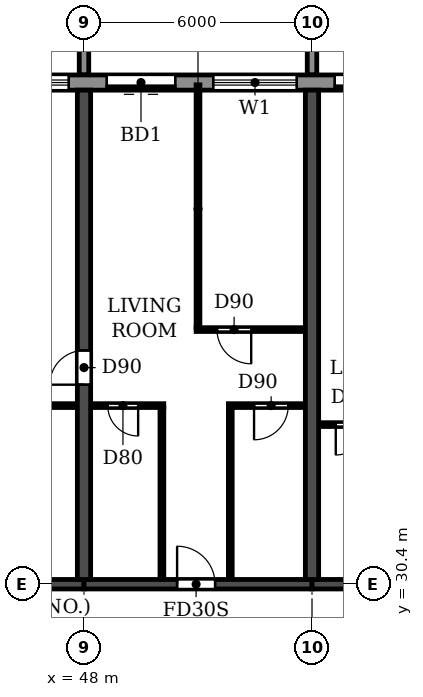
"""IFC4 building model, lengths in metres.
Left out: names, types, materials, properties, quantities, classifications, styles, units other than length and angle.
Written with IfcOpenShell. Run it as: python <this file> out.ifc"""

import sys

from ifc_helpers import new_model, si_unit, direction, frame, frame_2d, origin, place, context, subcontext, project, spatial, polyline, rectangle, outline, extrude, source, transform, mapped, element, fill, save


model = new_model("IFC4")
c1 = context("Model", 3, precision=1e-05, world=origin(), true_north=direction((0.0, 1.0)))
c2 = subcontext(c1, "Body", "Model", "MODEL_VIEW")
j1 = project(units=[si_unit("LENGTHUNIT", "METRE"), si_unit("PLANEANGLEUNIT", "RADIAN")], contexts=[c1])
p1 = place(None, origin())
s1 = spatial("IfcSite", under=j1, at=p1, CompositionType="ELEMENT")
p2 = place(p1, origin())
s2 = spatial("IfcBuilding", under=s1, at=p2, CompositionType="ELEMENT")
p3 = place(p2, frame((0.0, 0.0, 112.5)))
s3 = spatial("IfcBuildingStorey", under=s2, at=p3, CompositionType="ELEMENT", Elevation=112.5)
p4 = place(p3, frame((48.0, 30.525, 0.0), z_axis=(0.0, 0.0, 1.0), x_axis=(0.0, 1.0, 0.0)))
e1 = element("IfcWall", 1, at=p4, inside=s3, PredefinedType="SHEAR", context=c2, shape_type="SweptSolid", body=[
    extrude(rectangle(XDim=12.875, YDim=0.35, at=frame_2d((6.438, 0.0))), origin(), (0.0, 0.0, 1.0), 2.95),
])
p5 = place(p4, frame((5.125, 0.0, 0.0)))
e2 = element("IfcOpeningElement", 2, at=p5, cuts=e1, PredefinedType="OPENING", context=c2, shape_type="SweptSolid", body=[
    extrude(rectangle(XDim=0.9, YDim=2.1, at=frame_2d((0.45, 1.05))), frame((0.0, 0.185, 0.0), z_axis=(0.0, -1.0, 0.0), x_axis=(1.0, 0.0, 0.0)), (0.0, 0.0, 1.0), 0.37),
])
p6 = place(p3, frame((54.0, 30.525, 0.0), z_axis=(0.0, 0.0, 1.0), x_axis=(0.0, 1.0, 0.0)))
e3 = element("IfcWall", 3, at=p6, inside=s3, PredefinedType="SHEAR", context=c2, shape_type="SweptSolid", body=[
    extrude(rectangle(XDim=12.875, YDim=0.35, at=frame_2d((6.438, 0.0))), origin(), (0.0, 0.0, 1.0), 2.95),
])
p7 = place(p3, frame((42.0, 30.4, 0.0), z_axis=(0.0, 0.0, 1.0), x_axis=(1.0, 0.0, 0.0)))
e4 = element("IfcWall", 4, at=p7, inside=s3, PredefinedType="SHEAR", context=c2, shape_type="SweptSolid", body=[
    extrude(rectangle(XDim=6.0, YDim=0.25, at=frame_2d((3.0, 0.0))), origin(), (0.0, 0.0, 1.0), 2.35),
])
p8 = place(p3, frame((48.0, 30.4, 0.0), z_axis=(0.0, 0.0, 1.0), x_axis=(1.0, 0.0, 0.0)))
e5 = element("IfcWall", 5, at=p8, inside=s3, PredefinedType="SHEAR", context=c2, shape_type="SweptSolid", body=[
    extrude(rectangle(XDim=6.0, YDim=0.25, at=frame_2d((3.0, 0.0))), origin(), (0.0, 0.0, 1.0), 2.35),
])
p9 = place(p8, frame((2.45, 0.0, 0.0)))
e6 = element("IfcOpeningElement", 6, at=p9, cuts=e5, PredefinedType="OPENING", context=c2, shape_type="SweptSolid", body=[
    extrude(rectangle(XDim=1.0, YDim=2.1, at=frame_2d((0.5, 1.05))), frame((0.0, 0.135, 0.0), z_axis=(0.0, -1.0, 0.0), x_axis=(1.0, 0.0, 0.0)), (0.0, 0.0, 1.0), 0.27),
])
p10 = place(p3, frame((54.0, 30.4, 0.0), z_axis=(0.0, 0.0, 1.0), x_axis=(1.0, 0.0, 0.0)))
e7 = element("IfcWall", 7, at=p10, inside=s3, PredefinedType="SHEAR", context=c2, shape_type="SweptSolid", body=[
    extrude(rectangle(XDim=6.0, YDim=0.25, at=frame_2d((3.0, 0.0))), origin(), (0.0, 0.0, 1.0), 2.35),
])
p11 = place(p10, frame((2.45, 0.0, 0.0)))
e8 = element("IfcOpeningElement", 8, at=p11, cuts=e7, PredefinedType="OPENING", context=c2, shape_type="SweptSolid", body=[
    extrude(rectangle(XDim=1.0, YDim=2.1, at=frame_2d((0.5, 1.05))), frame((0.0, 0.135, 0.0), z_axis=(0.0, -1.0, 0.0), x_axis=(1.0, 0.0, 0.0)), (0.0, 0.0, 1.0), 0.27),
])
p12 = place(p3, frame((85.317, 43.6, 0.0), z_axis=(0.0, 0.0, 1.0), x_axis=(-1.0, 0.0, 0.0)))
e9 = element("IfcWall", 9, at=p12, inside=s3, PredefinedType="STANDARD", context=c2, shape_type="SweptSolid", body=[
    extrude(rectangle(XDim=68.634, YDim=0.4, at=frame_2d((34.317, 0.0))), origin(), (0.0, 0.0, 1.0), 2.95),
])
p13 = place(p12, frame((64.917, 0.0, 0.0)))
e10 = element("IfcOpeningElement", 10, at=p13, cuts=e9, PredefinedType="OPENING", context=c2, shape_type="SweptSolid", body=[
    extrude(rectangle(XDim=1.8, YDim=2.4, at=frame_2d((0.9, 1.2))), frame((0.0, 0.21, 0.0), z_axis=(0.0, -1.0, 0.0), x_axis=(1.0, 0.0, 0.0)), (0.0, 0.0, 1.0), 0.42),
])
p14 = place(p12, frame((61.717, 0.0, 0.9)))
e11 = element("IfcOpeningElement", 11, at=p14, cuts=e9, PredefinedType="OPENING", context=c2, shape_type="SweptSolid", body=[
    extrude(rectangle(XDim=2.2, YDim=1.5, at=frame_2d((1.1, 0.75))), frame((0.0, 0.21, 0.0), z_axis=(0.0, -1.0, 0.0), x_axis=(1.0, 0.0, 0.0)), (0.0, 0.0, 1.0), 0.42),
])
p15 = place(p12, frame((58.717, 0.0, 0.9)))
e12 = element("IfcOpeningElement", 12, at=p15, cuts=e9, PredefinedType="OPENING", context=c2, shape_type="SweptSolid", body=[
    extrude(rectangle(XDim=2.2, YDim=1.5, at=frame_2d((1.1, 0.75))), frame((0.0, 0.21, 0.0), z_axis=(0.0, -1.0, 0.0), x_axis=(1.0, 0.0, 0.0)), (0.0, 0.0, 1.0), 0.42),
])
p16 = place(p12, frame((55.917, 0.0, 0.0)))
e13 = element("IfcOpeningElement", 13, at=p16, cuts=e9, PredefinedType="OPENING", context=c2, shape_type="SweptSolid", body=[
    extrude(rectangle(XDim=1.8, YDim=2.4, at=frame_2d((0.9, 1.2))), frame((0.0, 0.21, 0.0), z_axis=(0.0, -1.0, 0.0), x_axis=(1.0, 0.0, 0.0)), (0.0, 0.0, 1.0), 0.42),
])
p17 = place(p12, frame((52.917, 0.0, 0.0)))
e14 = element("IfcOpeningElement", 14, at=p17, cuts=e9, PredefinedType="OPENING", context=c2, shape_type="SweptSolid", body=[
    extrude(rectangle(XDim=1.8, YDim=2.4, at=frame_2d((0.9, 1.2))), frame((0.0, 0.21, 0.0), z_axis=(0.0, -1.0, 0.0), x_axis=(1.0, 0.0, 0.0)), (0.0, 0.0, 1.0), 0.42),
])
p18 = place(p12, frame((49.717, 0.0, 0.9)))
e15 = element("IfcOpeningElement", 15, at=p18, cuts=e9, PredefinedType="OPENING", context=c2, shape_type="SweptSolid", body=[
    extrude(rectangle(XDim=2.2, YDim=1.5, at=frame_2d((1.1, 0.75))), frame((0.0, 0.21, 0.0), z_axis=(0.0, -1.0, 0.0), x_axis=(1.0, 0.0, 0.0)), (0.0, 0.0, 1.0), 0.42),
])
p19 = place(p12, frame((46.717, 0.0, 0.9)))
e16 = element("IfcOpeningElement", 16, at=p19, cuts=e9, PredefinedType="OPENING", context=c2, shape_type="SweptSolid", body=[
    extrude(rectangle(XDim=2.2, YDim=1.5, at=frame_2d((1.1, 0.75))), frame((0.0, 0.21, 0.0), z_axis=(0.0, -1.0, 0.0), x_axis=(1.0, 0.0, 0.0)), (0.0, 0.0, 1.0), 0.42),
])
p20 = place(p12, frame((43.917, 0.0, 0.0)))
e17 = element("IfcOpeningElement", 17, at=p20, cuts=e9, PredefinedType="OPENING", context=c2, shape_type="SweptSolid", body=[
    extrude(rectangle(XDim=1.8, YDim=2.4, at=frame_2d((0.9, 1.2))), frame((0.0, 0.21, 0.0), z_axis=(0.0, -1.0, 0.0), x_axis=(1.0, 0.0, 0.0)), (0.0, 0.0, 1.0), 0.42),
])
p21 = place(p12, frame((40.717, 0.0, 0.9)))
e18 = element("IfcOpeningElement", 18, at=p21, cuts=e9, PredefinedType="OPENING", context=c2, shape_type="SweptSolid", body=[
    extrude(rectangle(XDim=2.2, YDim=1.5, at=frame_2d((1.1, 0.75))), frame((0.0, 0.21, 0.0), z_axis=(0.0, -1.0, 0.0), x_axis=(1.0, 0.0, 0.0)), (0.0, 0.0, 1.0), 0.42),
])
p22 = place(p12, frame((37.717, 0.0, 0.9)))
e19 = element("IfcOpeningElement", 19, at=p22, cuts=e9, PredefinedType="OPENING", context=c2, shape_type="SweptSolid", body=[
    extrude(rectangle(XDim=2.2, YDim=1.5, at=frame_2d((1.1, 0.75))), frame((0.0, 0.21, 0.0), z_axis=(0.0, -1.0, 0.0), x_axis=(1.0, 0.0, 0.0)), (0.0, 0.0, 1.0), 0.42),
])
p23 = place(p12, frame((34.917, 0.0, 0.0)))
e20 = element("IfcOpeningElement", 20, at=p23, cuts=e9, PredefinedType="OPENING", context=c2, shape_type="SweptSolid", body=[
    extrude(rectangle(XDim=1.8, YDim=2.4, at=frame_2d((0.9, 1.2))), frame((0.0, 0.21, 0.0), z_axis=(0.0, -1.0, 0.0), x_axis=(1.0, 0.0, 0.0)), (0.0, 0.0, 1.0), 0.42),
])
p24 = place(p12, frame((31.717, 0.0, 0.9)))
e21 = element("IfcOpeningElement", 21, at=p24, cuts=e9, PredefinedType="OPENING", context=c2, shape_type="SweptSolid", body=[
    extrude(rectangle(XDim=2.2, YDim=1.5, at=frame_2d((1.1, 0.75))), frame((0.0, 0.21, 0.0), z_axis=(0.0, -1.0, 0.0), x_axis=(1.0, 0.0, 0.0)), (0.0, 0.0, 1.0), 0.42),
])
p25 = place(p12, frame((28.917, 0.0, 0.0)))
e22 = element("IfcOpeningElement", 22, at=p25, cuts=e9, PredefinedType="OPENING", context=c2, shape_type="SweptSolid", body=[
    extrude(rectangle(XDim=1.8, YDim=2.4, at=frame_2d((0.9, 1.2))), frame((0.0, 0.21, 0.0), z_axis=(0.0, -1.0, 0.0), x_axis=(1.0, 0.0, 0.0)), (0.0, 0.0, 1.0), 0.42),
])
p26 = place(p12, frame((25.717, 0.0, 0.9)))
e23 = element("IfcOpeningElement", 23, at=p26, cuts=e9, PredefinedType="OPENING", context=c2, shape_type="SweptSolid", body=[
    extrude(rectangle(XDim=2.2, YDim=1.5, at=frame_2d((1.1, 0.75))), frame((0.0, 0.21, 0.0), z_axis=(0.0, -1.0, 0.0), x_axis=(1.0, 0.0, 0.0)), (0.0, 0.0, 1.0), 0.42),
])
p27 = place(p12, frame((22.717, 0.0, 0.9)))
e24 = element("IfcOpeningElement", 24, at=p27, cuts=e9, PredefinedType="OPENING", context=c2, shape_type="SweptSolid", body=[
    extrude(rectangle(XDim=2.2, YDim=1.5, at=frame_2d((1.1, 0.75))), frame((0.0, 0.21, 0.0), z_axis=(0.0, -1.0, 0.0), x_axis=(1.0, 0.0, 0.0)), (0.0, 0.0, 1.0), 0.42),
])
p28 = place(p12, frame((19.917, 0.0, 0.0)))
e25 = element("IfcOpeningElement", 25, at=p28, cuts=e9, PredefinedType="OPENING", context=c2, shape_type="SweptSolid", body=[
    extrude(rectangle(XDim=1.8, YDim=2.4, at=frame_2d((0.9, 1.2))), frame((0.0, 0.21, 0.0), z_axis=(0.0, -1.0, 0.0), x_axis=(1.0, 0.0, 0.0)), (0.0, 0.0, 1.0), 0.42),
])
p29 = place(p12, frame((16.717, 0.0, 0.9)))
e26 = element("IfcOpeningElement", 26, at=p29, cuts=e9, PredefinedType="OPENING", context=c2, shape_type="SweptSolid", body=[
    extrude(rectangle(XDim=2.2, YDim=1.5, at=frame_2d((1.1, 0.75))), frame((0.0, 0.21, 0.0), z_axis=(0.0, -1.0, 0.0), x_axis=(1.0, 0.0, 0.0)), (0.0, 0.0, 1.0), 0.42),
])
p30 = place(p12, frame((13.917, 0.0, 0.0)))
e27 = element("IfcOpeningElement", 27, at=p30, cuts=e9, PredefinedType="OPENING", context=c2, shape_type="SweptSolid", body=[
    extrude(rectangle(XDim=1.8, YDim=2.4, at=frame_2d((0.9, 1.2))), frame((0.0, 0.21, 0.0), z_axis=(0.0, -1.0, 0.0), x_axis=(1.0, 0.0, 0.0)), (0.0, 0.0, 1.0), 0.42),
])
p31 = place(p12, frame((10.717, 0.0, 0.9)))
e28 = element("IfcOpeningElement", 28, at=p31, cuts=e9, PredefinedType="OPENING", context=c2, shape_type="SweptSolid", body=[
    extrude(rectangle(XDim=2.2, YDim=1.5, at=frame_2d((1.1, 0.75))), frame((0.0, 0.21, 0.0), z_axis=(0.0, -1.0, 0.0), x_axis=(1.0, 0.0, 0.0)), (0.0, 0.0, 1.0), 0.42),
])
p32 = place(p12, frame((7.717, 0.0, 0.9)))
e29 = element("IfcOpeningElement", 29, at=p32, cuts=e9, PredefinedType="OPENING", context=c2, shape_type="SweptSolid", body=[
    extrude(rectangle(XDim=2.2, YDim=1.5, at=frame_2d((1.1, 0.75))), frame((0.0, 0.21, 0.0), z_axis=(0.0, -1.0, 0.0), x_axis=(1.0, 0.0, 0.0)), (0.0, 0.0, 1.0), 0.42),
])
p33 = place(p12, frame((4.917, 0.0, 0.0)))
e30 = element("IfcOpeningElement", 30, at=p33, cuts=e9, PredefinedType="OPENING", context=c2, shape_type="SweptSolid", body=[
    extrude(rectangle(XDim=1.8, YDim=2.4, at=frame_2d((0.9, 1.2))), frame((0.0, 0.21, 0.0), z_axis=(0.0, -1.0, 0.0), x_axis=(1.0, 0.0, 0.0)), (0.0, 0.0, 1.0), 0.42),
])
p34 = place(p12, frame((1.717, 0.0, 0.9)))
e31 = element("IfcOpeningElement", 31, at=p34, cuts=e9, PredefinedType="OPENING", context=c2, shape_type="SweptSolid", body=[
    extrude(rectangle(XDim=2.2, YDim=1.5, at=frame_2d((1.1, 0.75))), frame((0.0, 0.21, 0.0), z_axis=(0.0, -1.0, 0.0), x_axis=(1.0, 0.0, 0.0)), (0.0, 0.0, 1.0), 0.42),
])
m1 = source(origin(), c2, "Body", "SweptSolid", [
    extrude(outline(polyline([(0.0, 0.0), (0.25, 0.0), (0.25, 3.1), (0.0, 3.1), (0.0, 0.0)])), origin(), (0.0, 0.0, 1.0), 3.1),
])
for number, where in (
    (32, (47.875, 43.8, 0.0)),
    (33, (53.875, 43.8, 0.0)),
):
    element("IfcWall", number, at=place(p3, frame(where)), inside=s3, PredefinedType="STANDARD", context=c2, shape_type="MappedRepresentation", body=[
        mapped(m1, transform((0.0, 0.0, 0.0))),
    ])
p35 = place(p3, frame((54.185, 34.6, 0.0), z_axis=(0.0, 0.0, 1.0), x_axis=(1.0, 0.0, 0.0)))
e34 = element("IfcWall", 34, at=p35, inside=s3, PredefinedType="PARTITIONING", context=c2, shape_type="SweptSolid", body=[
    extrude(rectangle(XDim=1.915, YDim=0.1, at=frame_2d((0.958, 0.0))), origin(), (0.0, 0.0, 1.0), 2.95),
])
p36 = place(p35, frame((0.44, 0.0, 0.0)))
e35 = element("IfcOpeningElement", 35, at=p36, cuts=e34, PredefinedType="OPENING", context=c2, shape_type="SweptSolid", body=[
    extrude(rectangle(XDim=0.8, YDim=2.1, at=frame_2d((0.4, 1.05))), frame((0.0, 0.06, 0.0), z_axis=(0.0, -1.0, 0.0), x_axis=(1.0, 0.0, 0.0)), (0.0, 0.0, 1.0), 0.12),
])
p37 = place(p3, frame((45.1, 35.1, 0.0), z_axis=(0.0, 0.0, 1.0), x_axis=(1.0, 0.0, 0.0)))
e36 = element("IfcWall", 36, at=p37, inside=s3, PredefinedType="PARTITIONING", context=c2, shape_type="SweptSolid", body=[
    extrude(rectangle(XDim=2.715, YDim=0.1, at=frame_2d((1.357, 0.0))), origin(), (0.0, 0.0, 1.0), 2.95),
])
p38 = place(p37, frame((1.0, 0.0, 0.0)))
e37 = element("IfcOpeningElement", 37, at=p38, cuts=e36, PredefinedType="OPENING", context=c2, shape_type="SweptSolid", body=[
    extrude(rectangle(XDim=0.8, YDim=2.1, at=frame_2d((0.4, 1.05))), frame((0.0, 0.06, 0.0), z_axis=(0.0, -1.0, 0.0), x_axis=(1.0, 0.0, 0.0)), (0.0, 0.0, 1.0), 0.12),
])
p39 = place(p3, frame((48.185, 35.1, 0.0), z_axis=(0.0, 0.0, 1.0), x_axis=(1.0, 0.0, 0.0)))
e38 = element("IfcWall", 38, at=p39, inside=s3, PredefinedType="PARTITIONING", context=c2, shape_type="SweptSolid", body=[
    extrude(rectangle(XDim=1.915, YDim=0.1, at=frame_2d((0.958, 0.0))), origin(), (0.0, 0.0, 1.0), 2.95),
])
p40 = place(p39, frame((0.44, 0.0, 0.0)))
e39 = element("IfcOpeningElement", 39, at=p40, cuts=e38, PredefinedType="OPENING", context=c2, shape_type="SweptSolid", body=[
    extrude(rectangle(XDim=0.8, YDim=2.1, at=frame_2d((0.4, 1.05))), frame((0.0, 0.06, 0.0), z_axis=(0.0, -1.0, 0.0), x_axis=(1.0, 0.0, 0.0)), (0.0, 0.0, 1.0), 0.12),
])
p41 = place(p3, frame((51.8, 35.1, 0.0), z_axis=(0.0, 0.0, 1.0), x_axis=(1.0, 0.0, 0.0)))
e40 = element("IfcWall", 40, at=p41, inside=s3, PredefinedType="PARTITIONING", context=c2, shape_type="SweptSolid", body=[
    extrude(rectangle(XDim=2.015, YDim=0.1, at=frame_2d((1.007, 0.0))), origin(), (0.0, 0.0, 1.0), 2.95),
])
p42 = place(p41, frame((0.675, 0.0, 0.0)))
e41 = element("IfcOpeningElement", 41, at=p42, cuts=e40, PredefinedType="OPENING", context=c2, shape_type="SweptSolid", body=[
    extrude(rectangle(XDim=0.9, YDim=2.1, at=frame_2d((0.45, 1.05))), frame((0.0, 0.06, 0.0), z_axis=(0.0, -1.0, 0.0), x_axis=(1.0, 0.0, 0.0)), (0.0, 0.0, 1.0), 0.12),
])
p43 = place(p3, frame((50.95, 37.1, 0.0), z_axis=(0.0, 0.0, 1.0), x_axis=(1.0, 0.0, 0.0)))
e42 = element("IfcWall", 42, at=p43, inside=s3, PredefinedType="PARTITIONING", context=c2, shape_type="SweptSolid", body=[
    extrude(rectangle(XDim=2.865, YDim=0.1, at=frame_2d((1.433, 0.0))), origin(), (0.0, 0.0, 1.0), 2.95),
])
p44 = place(p43, frame((0.55, 0.0, 0.0)))
e43 = element("IfcOpeningElement", 43, at=p44, cuts=e42, PredefinedType="OPENING", context=c2, shape_type="SweptSolid", body=[
    extrude(rectangle(XDim=0.9, YDim=2.1, at=frame_2d((0.45, 1.05))), frame((0.0, 0.06, 0.0), z_axis=(0.0, -1.0, 0.0), x_axis=(1.0, 0.0, 0.0)), (0.0, 0.0, 1.0), 0.12),
])
p45 = place(p3, frame((50.05, 30.535, 0.0), z_axis=(0.0, 0.0, 1.0), x_axis=(0.0, 1.0, 0.0)))
e44 = element("IfcWall", 44, at=p45, inside=s3, PredefinedType="PARTITIONING", context=c2, shape_type="SweptSolid", body=[
    extrude(rectangle(XDim=4.515, YDim=0.1, at=frame_2d((2.258, 0.0))), origin(), (0.0, 0.0, 1.0), 2.95),
])
p46 = place(p3, frame((51.0, 37.15, 0.0), z_axis=(0.0, 0.0, 1.0), x_axis=(0.0, 1.0, 0.0)))
e45 = element("IfcWall", 45, at=p46, inside=s3, PredefinedType="PARTITIONING", context=c2, shape_type="SweptSolid", body=[
    extrude(rectangle(XDim=6.39, YDim=0.1, at=frame_2d((3.195, 0.0))), origin(), (0.0, 0.0, 1.0), 2.95),
])
p47 = place(p3, frame((51.85, 30.535, 0.0), z_axis=(0.0, 0.0, 1.0), x_axis=(0.0, 1.0, 0.0)))
e46 = element("IfcWall", 46, at=p47, inside=s3, PredefinedType="PARTITIONING", context=c2, shape_type="SweptSolid", body=[
    extrude(rectangle(XDim=4.515, YDim=0.1, at=frame_2d((2.258, 0.0))), origin(), (0.0, 0.0, 1.0), 2.95),
])
p48 = place(p22, origin())
e47 = element("IfcWindow", 47, at=p48, inside=s3, PartitioningType="DOUBLE_PANEL_HORIZONTAL", PredefinedType="WINDOW", context=c2, shape_type="SweptSolid", body=[
    extrude(rectangle(XDim=2.2, YDim=1.5, at=frame_2d((1.1, 0.75))), frame((0.0, 0.03, 0.0), z_axis=(0.0, -1.0, 0.0), x_axis=(1.0, 0.0, 0.0)), (0.0, 0.0, 1.0), 0.06),
])
fill(e19, e47)
p49 = place(p23, origin())
e48 = element("IfcDoor", 48, at=p49, inside=s3, OperationType="DOUBLE_DOOR_SLIDING", PredefinedType="DOOR", context=c2, shape_type="SweptSolid", body=[
    extrude(rectangle(XDim=1.8, YDim=2.4, at=frame_2d((0.9, 1.2))), frame((0.0, 0.025, 0.0), z_axis=(0.0, -1.0, 0.0), x_axis=(1.0, 0.0, 0.0)), (0.0, 0.0, 1.0), 0.05),
])
fill(e20, e48)
p50 = place(p24, origin())
e49 = element("IfcWindow", 49, at=p50, inside=s3, PartitioningType="DOUBLE_PANEL_HORIZONTAL", PredefinedType="WINDOW", context=c2, shape_type="SweptSolid", body=[
    extrude(rectangle(XDim=2.2, YDim=1.5, at=frame_2d((1.1, 0.75))), frame((0.0, 0.03, 0.0), z_axis=(0.0, -1.0, 0.0), x_axis=(1.0, 0.0, 0.0)), (0.0, 0.0, 1.0), 0.06),
])
fill(e21, e49)
p51 = place(p25, origin())
e50 = element("IfcDoor", 50, at=p51, inside=s3, OperationType="DOUBLE_DOOR_SLIDING", PredefinedType="DOOR", context=c2, shape_type="SweptSolid", body=[
    extrude(rectangle(XDim=1.8, YDim=2.4, at=frame_2d((0.9, 1.2))), frame((0.0, 0.025, 0.0), z_axis=(0.0, -1.0, 0.0), x_axis=(1.0, 0.0, 0.0)), (0.0, 0.0, 1.0), 0.05),
])
fill(e22, e50)
p52 = place(p5, origin())
e51 = element("IfcDoor", 51, at=p52, inside=s3, OperationType="SINGLE_SWING_LEFT", PredefinedType="DOOR", context=c2, shape_type="SweptSolid", body=[
    extrude(rectangle(XDim=0.9, YDim=2.1, at=frame_2d((0.45, 1.05))), frame((0.0, 0.025, 0.0), z_axis=(0.0, -1.0, 0.0), x_axis=(1.0, 0.0, 0.0)), (0.0, 0.0, 1.0), 0.05),
])
fill(e2, e51)
p53 = place(p40, frame((0.8, 0.0, 0.0), z_axis=(0.0, 0.0, 1.0), x_axis=(-1.0, 0.0, 0.0)))
e52 = element("IfcDoor", 52, at=p53, inside=s3, OperationType="SINGLE_SWING_LEFT", PredefinedType="DOOR", context=c2, shape_type="SweptSolid", body=[
    extrude(rectangle(XDim=0.8, YDim=2.1, at=frame_2d((0.4, 1.05))), frame((0.0, 0.025, 0.0), z_axis=(0.0, -1.0, 0.0), x_axis=(1.0, 0.0, 0.0)), (0.0, 0.0, 1.0), 0.05),
])
fill(e39, e52)
p54 = place(p9, origin())
e53 = element("IfcDoor", 53, at=p54, inside=s3, OperationType="SINGLE_SWING_LEFT", PredefinedType="DOOR", context=c2, shape_type="SweptSolid", body=[
    extrude(rectangle(XDim=1.0, YDim=2.1, at=frame_2d((0.5, 1.05))), frame((0.0, 0.025, 0.0), z_axis=(0.0, -1.0, 0.0), x_axis=(1.0, 0.0, 0.0)), (0.0, 0.0, 1.0), 0.05),
])
fill(e6, e53)
p55 = place(p44, frame((0.9, 0.0, 0.0), z_axis=(0.0, 0.0, 1.0), x_axis=(-1.0, 0.0, 0.0)))
e54 = element("IfcDoor", 54, at=p55, inside=s3, OperationType="SINGLE_SWING_LEFT", PredefinedType="DOOR", context=c2, shape_type="SweptSolid", body=[
    extrude(rectangle(XDim=0.9, YDim=2.1, at=frame_2d((0.45, 1.05))), frame((0.0, 0.025, 0.0), z_axis=(0.0, -1.0, 0.0), x_axis=(1.0, 0.0, 0.0)), (0.0, 0.0, 1.0), 0.05),
])
fill(e43, e54)
p56 = place(p42, frame((0.9, 0.0, 0.0), z_axis=(0.0, 0.0, 1.0), x_axis=(-1.0, 0.0, 0.0)))
e55 = element("IfcDoor", 55, at=p56, inside=s3, OperationType="SINGLE_SWING_RIGHT", PredefinedType="DOOR", context=c2, shape_type="SweptSolid", body=[
    extrude(rectangle(XDim=0.9, YDim=2.1, at=frame_2d((0.45, 1.05))), frame((0.0, 0.025, 0.0), z_axis=(0.0, -1.0, 0.0), x_axis=(1.0, 0.0, 0.0)), (0.0, 0.0, 1.0), 0.05),
])
fill(e41, e55)
p57 = place(p36, frame((0.8, 0.0, 0.0), z_axis=(0.0, 0.0, 1.0), x_axis=(-1.0, 0.0, 0.0)))
e56 = element("IfcDoor", 56, at=p57, inside=s3, OperationType="SINGLE_SWING_RIGHT", PredefinedType="DOOR", context=c2, shape_type="SweptSolid", body=[
    extrude(rectangle(XDim=0.8, YDim=2.1, at=frame_2d((0.4, 1.05))), frame((0.0, 0.025, 0.0), z_axis=(0.0, -1.0, 0.0), x_axis=(1.0, 0.0, 0.0)), (0.0, 0.0, 1.0), 0.05),
])
fill(e35, e56)
save(model, sys.argv[1])
